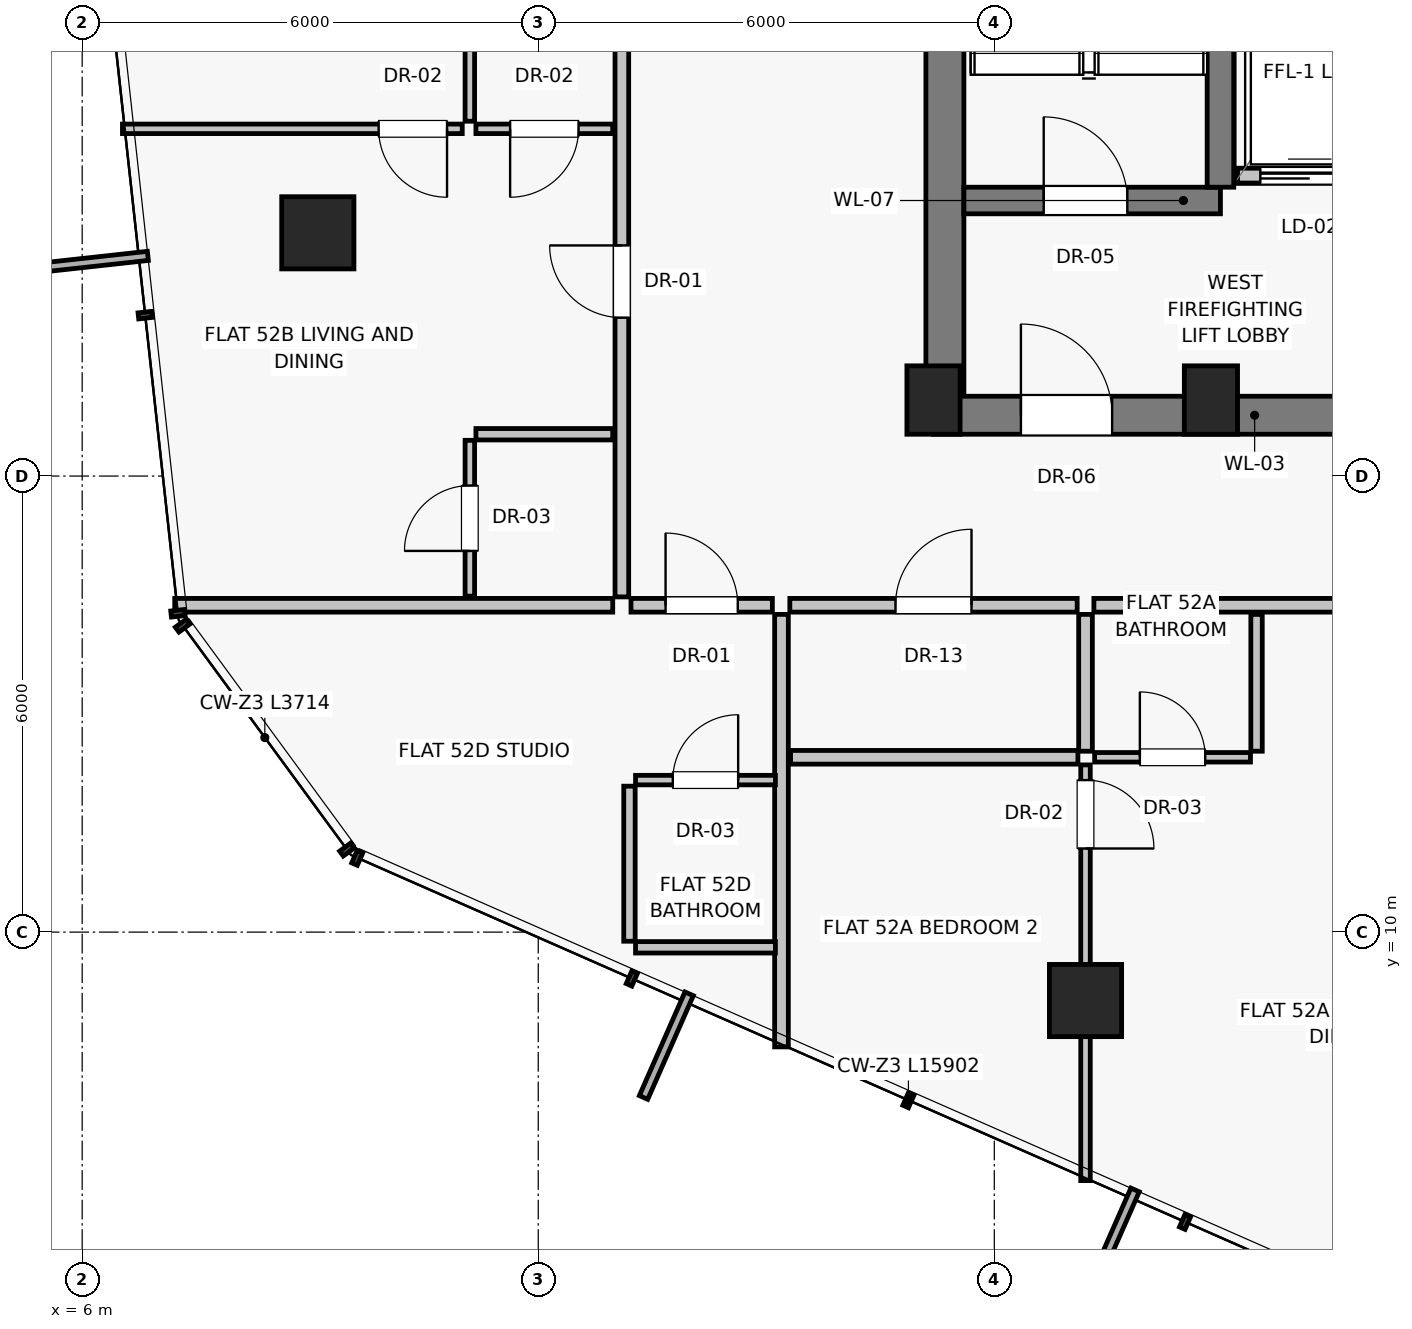
"""IFC4 building model, lengths in metres.
Left out: names, types, materials, properties, quantities, classifications, styles, units other than length and angle.
Written with IfcOpenShell. Run it as: python <this file> out.ifc"""

import sys

from ifc_helpers import new_model, si_unit, direction, frame, frame_2d, origin, origin_2d, place, context, subcontext, project, spatial, rectangle, extrude, source, transform, mapped, element, fill, save


model = new_model("IFC4")
c1 = context("Model", 3, precision=1e-05, world=origin(), true_north=direction((0.0, 1.0)))
c2 = subcontext(c1, "Body", "Model", "MODEL_VIEW")
j1 = project(units=[si_unit("LENGTHUNIT", "METRE"), si_unit("PLANEANGLEUNIT", "RADIAN")], contexts=[c1])
p1 = place(None, origin())
s1 = spatial("IfcSite", under=j1, at=p1, CompositionType="ELEMENT")
p2 = place(p1, origin())
s2 = spatial("IfcBuilding", under=s1, at=p2, CompositionType="ELEMENT")
p3 = place(p2, frame((0.0, 0.0, 185.35)))
s3 = spatial("IfcBuildingStorey", under=s2, at=p3, CompositionType="ELEMENT", Elevation=185.35)
for number, where, z_axis, x_axis in (
    (1, (17.2, 17.0, 0.0), (0.0, 0.0, 1.0), (1.0, 0.0, 0.0)),
    (2, (20.85, 17.0, 0.0), (0.0, 0.0, 1.0), (1.0, 0.0, 0.0)),
):
    element("IfcColumn", number, at=place(p3, frame(where, z_axis=z_axis, x_axis=x_axis)), inside=s3, PredefinedType="PILASTER", context=c2, shape_type="SweptSolid", body=[
        extrude(rectangle(XDim=0.7, YDim=0.9, at=origin_2d()), origin(), (0.0, 0.0, 1.0), 3.25),
    ])
for number, where, z_axis, x_axis in (
    (3, (9.1, 19.2, 0.0), (0.0, 0.0, 1.0), (1.0, 0.0, 0.0)),
    (4, (19.2, 9.1, 0.0), (0.0, 0.0, 1.0), (1.0, 0.0, 0.0)),
):
    element("IfcColumn", number, at=place(p3, frame(where, z_axis=z_axis, x_axis=x_axis)), inside=s3, PredefinedType="COLUMN", context=c2, shape_type="SweptSolid", body=[
        extrude(rectangle(XDim=0.95, YDim=0.95, at=origin_2d()), origin(), (0.0, 0.0, 1.0), 3.25),
    ])
p4 = place(p3, frame((17.35, 16.8, 0.0), z_axis=(0.0, 0.0, 1.0), x_axis=(0.0, 1.0, 0.0)))
e5 = element("IfcWall", 5, at=p4, inside=s3, PredefinedType="SHEAR", context=c2, shape_type="SweptSolid", body=[
    extrude(rectangle(XDim=14.2, YDim=0.5, at=frame_2d((7.1, 0.0))), origin(), (0.0, 0.0, 1.0), 3.015),
])
p5 = place(p3, frame((17.2, 16.8, 0.0), z_axis=(0.0, 0.0, 1.0), x_axis=(1.0, 0.0, 0.0)))
e6 = element("IfcWall", 6, at=p5, inside=s3, PredefinedType="SHEAR", context=c2, shape_type="SweptSolid", body=[
    extrude(rectangle(XDim=5.85, YDim=0.5, at=frame_2d((2.925, 0.0))), origin(), (0.0, 0.0, 1.0), 3.015),
])
p6 = place(p5, frame((1.15, 0.0, 0.0)))
e7 = element("IfcOpeningElement", 7, at=p6, cuts=e6, PredefinedType="OPENING", context=c2, shape_type="SweptSolid", body=[
    extrude(rectangle(XDim=1.2, YDim=2.03, at=frame_2d((0.6, 1.015))), frame((0.0, 0.26, 0.0), z_axis=(0.0, -1.0, 0.0), x_axis=(1.0, 0.0, 0.0)), (0.0, 0.0, 1.0), 0.52),
])
p7 = place(p3, frame((17.6, 19.625, 0.0), z_axis=(0.0, 0.0, 1.0), x_axis=(1.0, 0.0, 0.0)))
e8 = element("IfcWall", 8, at=p7, inside=s3, PredefinedType="SHEAR", context=c2, shape_type="SweptSolid", body=[
    extrude(rectangle(XDim=3.375, YDim=0.35, at=frame_2d((1.688, 0.0))), origin(), (0.0, 0.0, 1.0), 3.015),
])
p8 = place(p7, frame((1.05, 0.0, 0.0)))
e9 = element("IfcOpeningElement", 9, at=p8, cuts=e8, PredefinedType="OPENING", context=c2, shape_type="SweptSolid", body=[
    extrude(rectangle(XDim=1.1, YDim=2.03, at=frame_2d((0.55, 1.015))), frame((0.0, 0.185, 0.0), z_axis=(0.0, -1.0, 0.0), x_axis=(1.0, 0.0, 0.0)), (0.0, 0.0, 1.0), 0.37),
])
p9 = place(p3, frame((21.2, 19.95, 0.0), z_axis=(0.0, 0.0, 1.0), x_axis=(1.0, 0.0, 0.0)))
e10 = element("IfcWall", 10, at=p9, inside=s3, PredefinedType="SOLIDWALL", context=c2, shape_type="SweptSolid", body=[
    extrude(rectangle(XDim=1.85, YDim=0.2, at=frame_2d((0.925, 0.0))), origin(), (0.0, 0.0, 1.0), 3.015),
])
p10 = place(p9, frame((0.3, 0.0, 0.0)))
e11 = element("IfcOpeningElement", 11, at=p10, cuts=e10, PredefinedType="OPENING", context=c2, shape_type="SweptSolid", body=[
    extrude(rectangle(XDim=1.3, YDim=2.25, at=frame_2d((0.65, 1.125))), frame((0.0, 0.11, 0.0), z_axis=(0.0, -1.0, 0.0), x_axis=(1.0, 0.0, 0.0)), (0.0, 0.0, 1.0), 0.22),
])
p11 = place(p3, frame((20.975, 19.8, 0.0), z_axis=(0.0, 0.0, 1.0), x_axis=(0.0, 1.0, 0.0)))
e12 = element("IfcWall", 12, at=p11, inside=s3, PredefinedType="SHEAR", context=c2, shape_type="SweptSolid", body=[
    extrude(rectangle(XDim=8.775, YDim=0.35, at=frame_2d((4.387, 0.0))), origin(), (0.0, 0.0, 1.0), 3.015),
])
p12 = place(p3, frame((15.2, 14.18, 0.0), z_axis=(0.0, 0.0, 1.0), x_axis=(0.0, -1.0, 0.0)))
e13 = element("IfcWall", 13, at=p12, inside=s3, PredefinedType="PARTITIONING", context=c2, shape_type="SweptSolid", body=[
    extrude(rectangle(XDim=5.69, YDim=0.18, at=frame_2d((2.845, 0.0))), origin(), (0.0, 0.0, 1.0), 3.015),
])
p13 = place(p3, frame((15.31, 14.3, 0.0), z_axis=(0.0, 0.0, 1.0), x_axis=(1.0, 0.0, 0.0)))
e14 = element("IfcWall", 14, at=p13, inside=s3, PredefinedType="PARTITIONING", context=c2, shape_type="SweptSolid", body=[
    extrude(rectangle(XDim=3.78, YDim=0.18, at=frame_2d((1.89, 0.0))), origin(), (0.0, 0.0, 1.0), 3.015),
])
p14 = place(p13, frame((1.39, 0.0, 0.0)))
e15 = element("IfcOpeningElement", 15, at=p14, cuts=e14, PredefinedType="OPENING", context=c2, shape_type="SweptSolid", body=[
    extrude(rectangle(XDim=1.0, YDim=2.01, at=frame_2d((0.5, 1.005))), frame((0.0, 0.1, 0.0), z_axis=(0.0, -1.0, 0.0), x_axis=(1.0, 0.0, 0.0)), (0.0, 0.0, 1.0), 0.2),
])
p15 = place(p3, frame((19.31, 14.3, 0.0), z_axis=(0.0, 0.0, 1.0), x_axis=(1.0, 0.0, 0.0)))
e16 = element("IfcWall", 16, at=p15, inside=s3, PredefinedType="PARTITIONING", context=c2, shape_type="SweptSolid", body=[
    extrude(rectangle(XDim=11.78, YDim=0.18, at=frame_2d((5.89, 0.0))), origin(), (0.0, 0.0, 1.0), 3.015),
])
p16 = place(p15, frame((3.98, 0.0, 0.0)))
e17 = element("IfcOpeningElement", 17, at=p16, cuts=e16, PredefinedType="OPENING", context=c2, shape_type="SweptSolid", body=[
    extrude(rectangle(XDim=0.95, YDim=2.02, at=frame_2d((0.475, 1.01))), frame((0.0, 0.1, 0.0), z_axis=(0.0, -1.0, 0.0), x_axis=(1.0, 0.0, 0.0)), (0.0, 0.0, 1.0), 0.2),
])
p17 = place(p3, frame((15.32, 12.3, 0.0), z_axis=(0.0, 0.0, 1.0), x_axis=(1.0, 0.0, 0.0)))
e18 = element("IfcWall", 18, at=p17, inside=s3, PredefinedType="PARTITIONING", context=c2, shape_type="SweptSolid", body=[
    extrude(rectangle(XDim=3.78, YDim=0.18, at=frame_2d((1.89, 0.0))), origin(), (0.0, 0.0, 1.0), 3.015),
])
p18 = place(p3, frame((19.2, 14.18, 0.0), z_axis=(0.0, 0.0, 1.0), x_axis=(0.0, -1.0, 0.0)))
e19 = element("IfcWall", 19, at=p18, inside=s3, PredefinedType="PARTITIONING", context=c2, shape_type="SweptSolid", body=[
    extrude(rectangle(XDim=1.8, YDim=0.18, at=frame_2d((0.9, 0.0))), origin(), (0.0, 0.0, 1.0), 3.015),
])
p19 = place(p3, frame((19.2, 12.2, 0.0), z_axis=(0.0, 0.0, 1.0), x_axis=(0.0, -1.0, 0.0)))
e20 = element("IfcWall", 20, at=p19, inside=s3, PredefinedType="PARTITIONING", context=c2, shape_type="SweptSolid", body=[
    extrude(rectangle(XDim=5.469, YDim=0.125, at=frame_2d((2.734, 0.0))), origin(), (0.0, 0.0, 1.0), 2.469),
])
p20 = place(p19, frame((0.2, 0.0, 0.0)))
e21 = element("IfcOpeningElement", 21, at=p20, cuts=e20, PredefinedType="OPENING", context=c2, shape_type="SweptSolid", body=[
    extrude(rectangle(XDim=0.9, YDim=2.01, at=frame_2d((0.45, 1.005))), frame((0.0, 0.073, 0.0), z_axis=(0.0, -1.0, 0.0), x_axis=(1.0, 0.0, 0.0)), (0.0, 0.0, 1.0), 0.145),
])
p21 = place(p3, frame((21.45, 14.18, 0.0), z_axis=(0.0, 0.0, 1.0), x_axis=(0.0, -1.0, 0.0)))
e22 = element("IfcWall", 22, at=p21, inside=s3, PredefinedType="PARTITIONING", context=c2, shape_type="SweptSolid", body=[
    extrude(rectangle(XDim=1.8, YDim=0.15, at=frame_2d((0.9, 0.0))), origin(), (0.0, 0.0, 1.0), 3.015),
])
p22 = place(p3, frame((19.32, 12.3, 0.0), z_axis=(0.0, 0.0, 1.0), x_axis=(1.0, 0.0, 0.0)))
e23 = element("IfcWall", 23, at=p22, inside=s3, PredefinedType="PARTITIONING", context=c2, shape_type="SweptSolid", body=[
    extrude(rectangle(XDim=2.05, YDim=0.125, at=frame_2d((1.025, 0.0))), origin(), (0.0, 0.0, 1.0), 3.015),
])
p23 = place(p22, frame((0.595, 0.0, 0.0)))
e24 = element("IfcOpeningElement", 24, at=p23, cuts=e23, PredefinedType="OPENING", context=c2, shape_type="SweptSolid", body=[
    extrude(rectangle(XDim=0.86, YDim=2.01, at=frame_2d((0.43, 1.005))), frame((0.0, 0.073, 0.0), z_axis=(0.0, -1.0, 0.0), x_axis=(1.0, 0.0, 0.0)), (0.0, 0.0, 1.0), 0.145),
])
p24 = place(p3, frame((12.98, 14.3, 0.0), z_axis=(0.0, 0.0, 1.0), x_axis=(-1.0, 0.0, 0.0)))
e25 = element("IfcWall", 25, at=p24, inside=s3, PredefinedType="PARTITIONING", context=c2, shape_type="SweptSolid", body=[
    extrude(rectangle(XDim=5.763, YDim=0.18, at=frame_2d((2.881, 0.0))), origin(), (0.0, 0.0, 1.0), 3.015),
])
p25 = place(p3, frame((13.1, 14.41, 0.0), z_axis=(0.0, 0.0, 1.0), x_axis=(0.0, 1.0, 0.0)))
e26 = element("IfcWall", 26, at=p25, inside=s3, PredefinedType="PARTITIONING", context=c2, shape_type="SweptSolid", body=[
    extrude(rectangle(XDim=11.176, YDim=0.18, at=frame_2d((5.588, 0.0))), origin(), (0.0, 0.0, 1.0), 2.662),
])
p26 = place(p25, frame((3.674, 0.0, 0.0)))
e27 = element("IfcOpeningElement", 27, at=p26, cuts=e26, PredefinedType="OPENING", context=c2, shape_type="SweptSolid", body=[
    extrude(rectangle(XDim=0.95, YDim=2.02, at=frame_2d((0.475, 1.01))), frame((0.0, 0.1, 0.0), z_axis=(0.0, -1.0, 0.0), x_axis=(1.0, 0.0, 0.0)), (0.0, 0.0, 1.0), 0.2),
])
p27 = place(p3, frame((12.98, 16.55, 0.0), z_axis=(0.0, 0.0, 1.0), x_axis=(-1.0, 0.0, 0.0)))
e28 = element("IfcWall", 28, at=p27, inside=s3, PredefinedType="PARTITIONING", context=c2, shape_type="SweptSolid", body=[
    extrude(rectangle(XDim=1.8, YDim=0.15, at=frame_2d((0.9, 0.0))), origin(), (0.0, 0.0, 1.0), 3.015),
])
p28 = place(p3, frame((11.1, 14.42, 0.0), z_axis=(0.0, 0.0, 1.0), x_axis=(0.0, 1.0, 0.0)))
e29 = element("IfcWall", 29, at=p28, inside=s3, PredefinedType="PARTITIONING", context=c2, shape_type="SweptSolid", body=[
    extrude(rectangle(XDim=2.05, YDim=0.125, at=frame_2d((1.025, 0.0))), origin(), (0.0, 0.0, 1.0), 3.015),
])
p29 = place(p28, frame((0.595, 0.0, 0.0)))
e30 = element("IfcOpeningElement", 30, at=p29, cuts=e29, PredefinedType="OPENING", context=c2, shape_type="SweptSolid", body=[
    extrude(rectangle(XDim=0.86, YDim=2.01, at=frame_2d((0.43, 1.005))), frame((0.0, 0.073, 0.0), z_axis=(0.0, -1.0, 0.0), x_axis=(1.0, 0.0, 0.0)), (0.0, 0.0, 1.0), 0.145),
])
p30 = place(p3, frame((12.98, 20.568, 0.0), z_axis=(0.0, 0.0, 1.0), x_axis=(-1.0, 0.0, 0.0)))
e31 = element("IfcWall", 31, at=p30, inside=s3, PredefinedType="PARTITIONING", context=c2, shape_type="SweptSolid", body=[
    extrude(rectangle(XDim=1.8, YDim=0.125, at=frame_2d((0.9, 0.0))), origin(), (0.0, 0.0, 1.0), 3.015),
])
p31 = place(p30, frame((0.45, 0.0, 0.0)))
e32 = element("IfcOpeningElement", 32, at=p31, cuts=e31, PredefinedType="OPENING", context=c2, shape_type="SweptSolid", body=[
    extrude(rectangle(XDim=0.9, YDim=2.01, at=frame_2d((0.45, 1.005))), frame((0.0, 0.073, 0.0), z_axis=(0.0, -1.0, 0.0), x_axis=(1.0, 0.0, 0.0)), (0.0, 0.0, 1.0), 0.145),
])
p32 = place(p3, frame((11.1, 20.668, 0.0), z_axis=(0.0, 0.0, 1.0), x_axis=(0.0, 1.0, 0.0)))
e33 = element("IfcWall", 33, at=p32, inside=s3, PredefinedType="PARTITIONING", context=c2, shape_type="SweptSolid", body=[
    extrude(rectangle(XDim=4.908, YDim=0.125, at=frame_2d((2.454, 0.0))), origin(), (0.0, 0.0, 1.0), 3.015),
])
p33 = place(p3, frame((11.0, 20.568, 0.0), z_axis=(0.0, 0.0, 1.0), x_axis=(-1.0, 0.0, 0.0)))
e34 = element("IfcWall", 34, at=p33, inside=s3, PredefinedType="PARTITIONING", context=c2, shape_type="SweptSolid", body=[
    extrude(rectangle(XDim=4.47, YDim=0.125, at=frame_2d((2.235, 0.0))), origin(), (0.0, 0.0, 1.0), 3.015),
])
p34 = place(p33, frame((0.2, 0.0, 0.0)))
e35 = element("IfcOpeningElement", 35, at=p34, cuts=e34, PredefinedType="OPENING", context=c2, shape_type="SweptSolid", body=[
    extrude(rectangle(XDim=0.9, YDim=2.01, at=frame_2d((0.45, 1.005))), frame((0.0, 0.073, 0.0), z_axis=(0.0, -1.0, 0.0), x_axis=(1.0, 0.0, 0.0)), (0.0, 0.0, 1.0), 0.145),
])
p35 = place(p3, frame((13.22, 14.3, 0.0), z_axis=(0.0, 0.0, 1.0), x_axis=(1.0, 0.0, 0.0)))
e36 = element("IfcWall", 36, at=p35, inside=s3, PredefinedType="PARTITIONING", context=c2, shape_type="SweptSolid", body=[
    extrude(rectangle(XDim=1.86, YDim=0.18, at=frame_2d((0.93, 0.0))), origin(), (0.0, 0.0, 1.0), 3.015),
])
p36 = place(p35, frame((0.455, 0.0, 0.0)))
e37 = element("IfcOpeningElement", 37, at=p36, cuts=e36, PredefinedType="OPENING", context=c2, shape_type="SweptSolid", body=[
    extrude(rectangle(XDim=0.95, YDim=2.02, at=frame_2d((0.475, 1.01))), frame((0.0, 0.1, 0.0), z_axis=(0.0, -1.0, 0.0), x_axis=(1.0, 0.0, 0.0)), (0.0, 0.0, 1.0), 0.2),
])
p37 = place(p3, frame((13.28, 12.0, 0.0), z_axis=(0.0, 0.0, 1.0), x_axis=(1.0, 0.0, 0.0)))
e38 = element("IfcWall", 38, at=p37, inside=s3, PredefinedType="PARTITIONING", context=c2, shape_type="SweptSolid", body=[
    extrude(rectangle(XDim=1.84, YDim=0.125, at=frame_2d((0.92, 0.0))), origin(), (0.0, 0.0, 1.0), 3.015),
])
p38 = place(p37, frame((0.49, 0.0, 0.0)))
e39 = element("IfcOpeningElement", 39, at=p38, cuts=e38, PredefinedType="OPENING", context=c2, shape_type="SweptSolid", body=[
    extrude(rectangle(XDim=0.86, YDim=2.01, at=frame_2d((0.43, 1.005))), frame((0.0, 0.073, 0.0), z_axis=(0.0, -1.0, 0.0), x_axis=(1.0, 0.0, 0.0)), (0.0, 0.0, 1.0), 0.145),
])
p39 = place(p3, frame((13.28, 9.8, 0.0), z_axis=(0.0, 0.0, 1.0), x_axis=(1.0, 0.0, 0.0)))
e40 = element("IfcWall", 40, at=p39, inside=s3, PredefinedType="PARTITIONING", context=c2, shape_type="SweptSolid", body=[
    extrude(rectangle(XDim=1.84, YDim=0.15, at=frame_2d((0.92, 0.0))), origin(), (0.0, 0.0, 1.0), 3.015),
])
p40 = place(p3, frame((13.2, 9.88, 0.0), z_axis=(0.0, 0.0, 1.0), x_axis=(0.0, 1.0, 0.0)))
e41 = element("IfcWall", 41, at=p40, inside=s3, PredefinedType="PARTITIONING", context=c2, shape_type="SweptSolid", body=[
    extrude(rectangle(XDim=2.04, YDim=0.15, at=frame_2d((1.02, 0.0))), origin(), (0.0, 0.0, 1.0), 3.015),
])
m1 = source(origin(), c2, "Body", "SweptSolid", [
    extrude(rectangle(XDim=1.2, YDim=2.03, at=frame_2d((0.6, 1.015))), frame((0.0, 0.025, 0.0), z_axis=(0.0, -1.0, 0.0), x_axis=(1.0, 0.0, 0.0)), (0.0, 0.0, 1.0), 0.05),
])
p41 = place(p6, origin())
e42 = element("IfcDoor", 42, at=p41, inside=s3, OperationType="SINGLE_SWING_LEFT", PredefinedType="DOOR", context=c2, shape_type="MappedRepresentation", body=[
    mapped(m1, transform((0.0, 0.0, 0.0), scale=1.0)),
])
fill(e7, e42)
m2 = source(origin(), c2, "Body", "SweptSolid", [
    extrude(rectangle(XDim=1.1, YDim=2.03, at=frame_2d((0.55, 1.015))), frame((0.0, 0.025, 0.0), z_axis=(0.0, -1.0, 0.0), x_axis=(1.0, 0.0, 0.0)), (0.0, 0.0, 1.0), 0.05),
])
p42 = place(p8, origin())
e43 = element("IfcDoor", 43, at=p42, inside=s3, OperationType="SINGLE_SWING_LEFT", PredefinedType="DOOR", context=c2, shape_type="MappedRepresentation", body=[
    mapped(m2, transform((0.0, 0.0, 0.0), scale=1.0)),
])
fill(e9, e43)
m3 = source(origin(), c2, "Body", "SweptSolid", [
    extrude(rectangle(XDim=1.3, YDim=2.25, at=frame_2d((0.65, 1.125))), frame((0.0, 0.025, 0.0), z_axis=(0.0, -1.0, 0.0), x_axis=(1.0, 0.0, 0.0)), (0.0, 0.0, 1.0), 0.05),
])
p43 = place(p10, origin())
e44 = element("IfcDoor", 44, at=p43, inside=s3, OperationType="SLIDING_TO_LEFT", PredefinedType="DOOR", context=c2, shape_type="MappedRepresentation", body=[
    mapped(m3, transform((0.0, 0.0, 0.0), scale=1.0)),
])
fill(e11, e44)
m4 = source(origin(), c2, "Body", "SweptSolid", [
    extrude(rectangle(XDim=1.0, YDim=2.01, at=frame_2d((0.5, 1.005))), frame((0.0, 0.025, 0.0), z_axis=(0.0, -1.0, 0.0), x_axis=(1.0, 0.0, 0.0)), (0.0, 0.0, 1.0), 0.05),
])
p44 = place(p14, origin())
e45 = element("IfcDoor", 45, at=p44, inside=s3, OperationType="SINGLE_SWING_RIGHT", PredefinedType="DOOR", context=c2, shape_type="MappedRepresentation", body=[
    mapped(m4, transform((0.0, 0.0, 0.0), scale=1.0)),
])
fill(e15, e45)
m5 = source(origin(), c2, "Body", "SweptSolid", [
    extrude(rectangle(XDim=0.9, YDim=2.01, at=frame_2d((0.45, 1.005))), frame((0.0, 0.025, 0.0), z_axis=(0.0, -1.0, 0.0), x_axis=(1.0, 0.0, 0.0)), (0.0, 0.0, 1.0), 0.05),
])
p45 = place(p20, origin())
e46 = element("IfcDoor", 46, at=p45, inside=s3, OperationType="SINGLE_SWING_RIGHT", PredefinedType="DOOR", context=c2, shape_type="MappedRepresentation", body=[
    mapped(m5, transform((0.0, 0.0, 0.0), scale=1.0)),
])
fill(e21, e46)
m6 = source(origin(), c2, "Body", "SweptSolid", [
    extrude(rectangle(XDim=0.86, YDim=2.01, at=frame_2d((0.43, 1.005))), frame((0.0, 0.025, 0.0), z_axis=(0.0, -1.0, 0.0), x_axis=(1.0, 0.0, 0.0)), (0.0, 0.0, 1.0), 0.05),
])
p46 = place(p23, origin())
e47 = element("IfcDoor", 47, at=p46, inside=s3, OperationType="SINGLE_SWING_LEFT", PredefinedType="DOOR", context=c2, shape_type="MappedRepresentation", body=[
    mapped(m6, transform((0.0, 0.0, 0.0), scale=1.0)),
])
fill(e24, e47)
m7 = source(origin(), c2, "Body", "SweptSolid", [
    extrude(rectangle(XDim=0.95, YDim=2.02, at=frame_2d((0.475, 1.01))), frame((0.0, 0.025, 0.0), z_axis=(0.0, -1.0, 0.0), x_axis=(1.0, 0.0, 0.0)), (0.0, 0.0, 1.0), 0.05),
])
p47 = place(p26, origin())
e48 = element("IfcDoor", 48, at=p47, inside=s3, OperationType="SINGLE_SWING_RIGHT", PredefinedType="DOOR", context=c2, shape_type="MappedRepresentation", body=[
    mapped(m7, transform((0.0, 0.0, 0.0), scale=1.0)),
])
fill(e27, e48)
p48 = place(p29, origin())
e49 = element("IfcDoor", 49, at=p48, inside=s3, OperationType="SINGLE_SWING_LEFT", PredefinedType="DOOR", context=c2, shape_type="MappedRepresentation", body=[
    mapped(m6, transform((0.0, 0.0, 0.0), scale=1.0)),
])
fill(e30, e49)
p49 = place(p31, origin())
e50 = element("IfcDoor", 50, at=p49, inside=s3, OperationType="SINGLE_SWING_RIGHT", PredefinedType="DOOR", context=c2, shape_type="MappedRepresentation", body=[
    mapped(m5, transform((0.0, 0.0, 0.0), scale=1.0)),
])
fill(e32, e50)
p50 = place(p34, origin())
e51 = element("IfcDoor", 51, at=p50, inside=s3, OperationType="SINGLE_SWING_LEFT", PredefinedType="DOOR", context=c2, shape_type="MappedRepresentation", body=[
    mapped(m5, transform((0.0, 0.0, 0.0), scale=1.0)),
])
fill(e35, e51)
p51 = place(p36, origin())
e52 = element("IfcDoor", 52, at=p51, inside=s3, OperationType="SINGLE_SWING_LEFT", PredefinedType="DOOR", context=c2, shape_type="MappedRepresentation", body=[
    mapped(m7, transform((0.0, 0.0, 0.0), scale=1.0)),
])
fill(e37, e52)
p52 = place(p38, origin())
e53 = element("IfcDoor", 53, at=p52, inside=s3, OperationType="SINGLE_SWING_RIGHT", PredefinedType="DOOR", context=c2, shape_type="MappedRepresentation", body=[
    mapped(m6, transform((0.0, 0.0, 0.0), scale=1.0)),
])
fill(e39, e53)
save(model, sys.argv[1])
